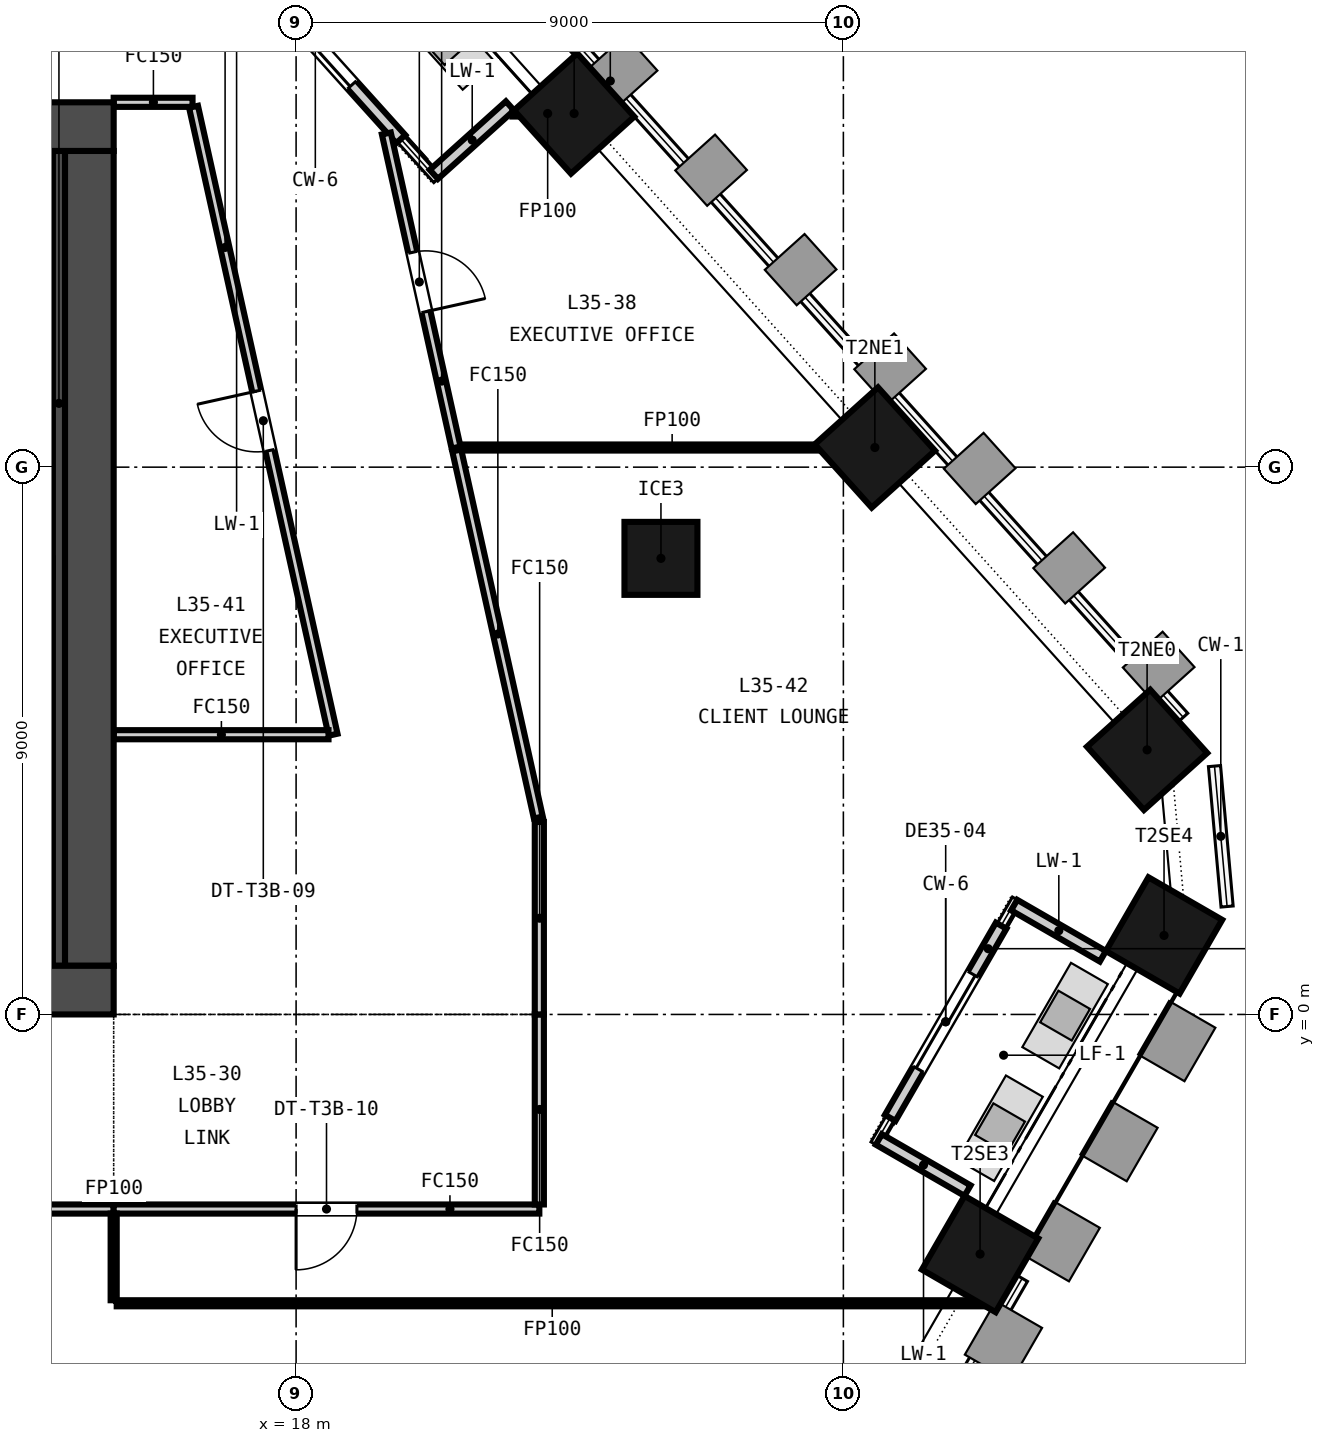
"""IFC4 building model, lengths in metres.
Left out: names, types, materials, properties, quantities, classifications, styles, units other than length and angle.
Written with IfcOpenShell. Run it as: python <this file> out.ifc"""

import sys

from ifc_helpers import new_model, si_unit, direction, frame, frame_2d, origin, origin_2d, place, context, subcontext, project, spatial, rectangle, extrude, element, fill, save


model = new_model("IFC4")
c1 = context("Model", 3, precision=1e-05, world=origin(), true_north=direction((0.0, 1.0)))
c2 = subcontext(c1, "Body", "Model", "MODEL_VIEW")
j1 = project(units=[si_unit("LENGTHUNIT", "METRE"), si_unit("PLANEANGLEUNIT", "RADIAN")], contexts=[c1])
p1 = place(None, origin())
s1 = spatial("IfcSite", under=j1, at=p1, CompositionType="ELEMENT")
p2 = place(p1, origin())
s2 = spatial("IfcBuilding", under=s1, at=p2, CompositionType="ELEMENT")
p3 = place(p2, frame((0.0, 0.0, 144.4)))
s3 = spatial("IfcBuildingStorey", under=s2, at=p3, CompositionType="ELEMENT", Elevation=144.4)
p4 = place(p3, frame((-15.0, 0.4, -0.15), z_axis=(0.0, 0.0, 1.0), x_axis=(1.0, 0.0, 0.0)))
e1 = element("IfcWall", 1, at=p4, inside=s3, PredefinedType="SOLIDWALL", context=c2, shape_type="SweptSolid", body=[
    extrude(rectangle(XDim=30.0, YDim=0.8, at=frame_2d((15.0, 0.0))), origin(), (0.0, 0.0, 1.0), 3.65),
])
p5 = place(p4, frame((5.8, 0.0, 0.15)))
e2 = element("IfcOpeningElement", 2, at=p5, cuts=e1, PredefinedType="OPENING", context=c2, shape_type="SweptSolid", body=[
    extrude(rectangle(XDim=2.4, YDim=2.4, at=frame_2d((1.2, 1.2))), frame((0.0, 0.41, 0.0), z_axis=(0.0, -1.0, 0.0), x_axis=(1.0, 0.0, 0.0)), (0.0, 0.0, 1.0), 0.82),
])
p6 = place(p4, frame((13.8, 0.0, 0.15)))
e3 = element("IfcOpeningElement", 3, at=p6, cuts=e1, PredefinedType="OPENING", context=c2, shape_type="SweptSolid", body=[
    extrude(rectangle(XDim=2.4, YDim=2.4, at=frame_2d((1.2, 1.2))), frame((0.0, 0.41, 0.0), z_axis=(0.0, -1.0, 0.0), x_axis=(1.0, 0.0, 0.0)), (0.0, 0.0, 1.0), 0.82),
])
p7 = place(p4, frame((21.8, 0.0, 0.15)))
e4 = element("IfcOpeningElement", 4, at=p7, cuts=e1, PredefinedType="OPENING", context=c2, shape_type="SweptSolid", body=[
    extrude(rectangle(XDim=2.4, YDim=2.4, at=frame_2d((1.2, 1.2))), frame((0.0, 0.41, 0.0), z_axis=(0.0, -1.0, 0.0), x_axis=(1.0, 0.0, 0.0)), (0.0, 0.0, 1.0), 0.82),
])
p8 = place(p4, frame((1.5, 0.0, 0.15)))
e5 = element("IfcOpeningElement", 5, at=p8, cuts=e1, PredefinedType="OPENING", context=c2, shape_type="SweptSolid", body=[
    extrude(rectangle(XDim=1.2, YDim=2.1, at=frame_2d((0.6, 1.05))), frame((0.0, 0.41, 0.0), z_axis=(0.0, -1.0, 0.0), x_axis=(1.0, 0.0, 0.0)), (0.0, 0.0, 1.0), 0.82),
])
p9 = place(p4, frame((27.3, 0.0, 0.15)))
e6 = element("IfcOpeningElement", 6, at=p9, cuts=e1, PredefinedType="OPENING", context=c2, shape_type="SweptSolid", body=[
    extrude(rectangle(XDim=1.2, YDim=2.1, at=frame_2d((0.6, 1.05))), frame((0.0, 0.41, 0.0), z_axis=(0.0, -1.0, 0.0), x_axis=(1.0, 0.0, 0.0)), (0.0, 0.0, 1.0), 0.82),
])
p10 = place(p3, frame((-15.0, 14.6, -0.15), z_axis=(0.0, 0.0, 1.0), x_axis=(1.0, 0.0, 0.0)))
e7 = element("IfcWall", 7, at=p10, inside=s3, PredefinedType="SOLIDWALL", context=c2, shape_type="SweptSolid", body=[
    extrude(rectangle(XDim=30.0, YDim=0.8, at=frame_2d((15.0, 0.0))), origin(), (0.0, 0.0, 1.0), 3.65),
])
p11 = place(p10, frame((9.25, 0.0, 0.15)))
e8 = element("IfcOpeningElement", 8, at=p11, cuts=e7, PredefinedType="OPENING", context=c2, shape_type="SweptSolid", body=[
    extrude(rectangle(XDim=1.5, YDim=2.1, at=frame_2d((0.75, 1.05))), frame((0.0, 0.41, 0.0), z_axis=(0.0, -1.0, 0.0), x_axis=(1.0, 0.0, 0.0)), (0.0, 0.0, 1.0), 0.82),
])
p12 = place(p10, frame((19.4, 0.0, 0.15)))
e9 = element("IfcOpeningElement", 9, at=p12, cuts=e7, PredefinedType="OPENING", context=c2, shape_type="SweptSolid", body=[
    extrude(rectangle(XDim=1.5, YDim=2.1, at=frame_2d((0.75, 1.05))), frame((0.0, 0.41, 0.0), z_axis=(0.0, -1.0, 0.0), x_axis=(1.0, 0.0, 0.0)), (0.0, 0.0, 1.0), 0.82),
])
p13 = place(p10, frame((1.5, 0.0, 0.15)))
e10 = element("IfcOpeningElement", 10, at=p13, cuts=e7, PredefinedType="OPENING", context=c2, shape_type="SweptSolid", body=[
    extrude(rectangle(XDim=1.2, YDim=2.1, at=frame_2d((0.6, 1.05))), frame((0.0, 0.41, 0.0), z_axis=(0.0, -1.0, 0.0), x_axis=(1.0, 0.0, 0.0)), (0.0, 0.0, 1.0), 0.82),
])
p14 = place(p10, frame((27.3, 0.0, 0.15)))
e11 = element("IfcOpeningElement", 11, at=p14, cuts=e7, PredefinedType="OPENING", context=c2, shape_type="SweptSolid", body=[
    extrude(rectangle(XDim=1.2, YDim=2.1, at=frame_2d((0.6, 1.05))), frame((0.0, 0.41, 0.0), z_axis=(0.0, -1.0, 0.0), x_axis=(1.0, 0.0, 0.0)), (0.0, 0.0, 1.0), 0.82),
])
p15 = place(p3, frame((14.6, 0.8, -0.15), z_axis=(0.0, 0.0, 1.0), x_axis=(0.0, 1.0, 0.0)))
e12 = element("IfcWall", 12, at=p15, inside=s3, PredefinedType="SOLIDWALL", context=c2, shape_type="SweptSolid", body=[
    extrude(rectangle(XDim=13.4, YDim=0.8, at=frame_2d((6.7, 0.0))), origin(), (0.0, 0.0, 1.0), 3.65),
])
for number, where, z_axis, x_axis in (
    (13, (29.248, -3.94, -0.15), (0.0, 0.0, 1.0), (0.5, 0.866, 0.0)),
    (14, (32.273, 1.299, -0.15), (0.0, 0.0, 1.0), (0.5, 0.866, 0.0)),
    (15, (31.995, 4.351, -0.15), (0.0, 0.0, 1.0), (-0.669, 0.743, 0.0)),
    (16, (27.518, 9.323, -0.15), (0.0, 0.0, 1.0), (-0.669, 0.743, 0.0)),
    (17, (22.573, 14.816, -0.15), (0.0, 0.0, 1.0), (-0.669, 0.743, 0.0)),
):
    element("IfcColumn", number, at=place(p3, frame(where, z_axis=z_axis, x_axis=x_axis)), inside=s3, PredefinedType="COLUMN", context=c2, shape_type="SweptSolid", body=[
        extrude(rectangle(XDim=1.4, YDim=1.4, at=origin_2d()), origin(), (0.0, 0.0, 1.0), 3.65),
    ])
p16 = place(p3, frame((24.0, 7.5, -0.15), z_axis=(0.0, 0.0, 1.0), x_axis=(1.0, 0.0, 0.0)))
e18 = element("IfcColumn", 18, at=p16, inside=s3, PredefinedType="COLUMN", context=c2, shape_type="SweptSolid", body=[
    extrude(rectangle(XDim=1.2, YDim=1.2, at=origin_2d()), origin(), (0.0, 0.0, 1.0), 3.65),
])
p17 = place(p3, frame((27.77, -1.701, 0.0), z_axis=(0.0, 0.0, 1.0), x_axis=(0.500002310952, 0.866024069551, 0.0)))
e19 = element("IfcWall", 19, at=p17, inside=s3, PredefinedType="SOLIDWALL", context=c2, shape_type="SweptSolid", body=[
    extrude(rectangle(XDim=3.65, YDim=0.2, at=frame_2d((1.825, 0.0))), origin(), (0.0, 0.0, 1.0), 2.9),
])
p18 = place(p17, frame((0.925, 0.0, 0.0)))
e20 = element("IfcOpeningElement", 20, at=p18, cuts=e19, PredefinedType="OPENING", context=c2, shape_type="SweptSolid", body=[
    extrude(rectangle(XDim=1.8, YDim=2.4, at=frame_2d((0.9, 1.2))), frame((0.0, 0.11, 0.0), z_axis=(0.0, -1.0, 0.0), x_axis=(1.0, 0.0, 0.0)), (0.0, 0.0, 1.0), 0.22),
])
for number, where, z_axis, x_axis in (
    (21, (29.042, -2.897, 0.0), (0.0, 0.0, 1.0), (-0.866, 0.5, 0.0)),
    (22, (31.267, 0.957, 0.0), (0.0, 0.0, 1.0), (-0.866, 0.5, 0.0)),
):
    element("IfcWall", number, at=place(p3, frame(where, z_axis=z_axis, x_axis=x_axis)), inside=s3, PredefinedType="SOLIDWALL", context=c2, shape_type="SweptSolid", body=[
        extrude(rectangle(XDim=1.684, YDim=0.2, at=frame_2d((0.842, 0.0))), origin(), (0.0, 0.0, 1.0), 3.05),
    ])
p19 = place(p3, frame((19.721, 14.395, 0.0), z_axis=(0.0, 0.0, 1.0), x_axis=(-0.669170241733, 0.743109135712, 0.0)))
e23 = element("IfcWall", 23, at=p19, inside=s3, PredefinedType="SOLIDWALL", context=c2, shape_type="SweptSolid", body=[
    extrude(rectangle(XDim=4.2, YDim=0.2, at=frame_2d((2.1, 0.0))), origin(), (0.0, 0.0, 1.0), 2.897),
])
p20 = place(p19, frame((1.2, 0.0, 0.0)))
e24 = element("IfcOpeningElement", 24, at=p20, cuts=e23, PredefinedType="OPENING", context=c2, shape_type="SweptSolid", body=[
    extrude(rectangle(XDim=1.8, YDim=2.4, at=frame_2d((0.9, 1.2))), frame((0.0, 0.11, 0.0), z_axis=(0.0, -1.0, 0.0), x_axis=(1.0, 0.0, 0.0)), (0.0, 0.0, 1.0), 0.22),
])
p21 = place(p3, frame((21.517, 14.942, 0.0), z_axis=(0.0, 0.0, 1.0), x_axis=(-0.743178790238, -0.669092882745, 0.0)))
e25 = element("IfcWall", 25, at=p21, inside=s3, PredefinedType="SOLIDWALL", context=c2, shape_type="SweptSolid", body=[
    extrude(rectangle(XDim=1.684, YDim=0.2, at=frame_2d((0.842, 0.0))), origin(), (0.0, 0.0, 1.0), 2.897),
])
p22 = place(p3, frame((11.05, 7.35, 0.0), z_axis=(0.0, 0.0, 1.0), x_axis=(1.0, 0.0, 0.0)))
e26 = element("IfcWall", 26, at=p22, inside=s3, PredefinedType="SOLIDWALL", context=c2, shape_type="SweptSolid", body=[
    extrude(rectangle(XDim=2.95, YDim=0.3, at=frame_2d((1.475, 0.0))), origin(), (0.0, 0.0, 1.0), 3.5),
])
p23 = place(p3, frame((14.1, 0.8, 0.0), z_axis=(0.0, 0.0, 1.0), x_axis=(0.0, 1.0, 0.0)))
e27 = element("IfcWall", 27, at=p23, inside=s3, PredefinedType="SOLIDWALL", context=c2, shape_type="SweptSolid", body=[
    extrude(rectangle(XDim=13.4, YDim=0.2, at=frame_2d((6.7, 0.0))), origin(), (0.0, 0.0, 1.0), 3.5),
])
p24 = place(p3, frame((15.0, -3.2, 0.0), z_axis=(0.0, 0.0, 1.0), x_axis=(-1.0, 0.0, 0.0)))
e28 = element("IfcWall", 28, at=p24, inside=s3, PredefinedType="PARTITIONING", context=c2, shape_type="SweptSolid", body=[
    extrude(rectangle(XDim=15.617, YDim=0.15, at=frame_2d((7.809, 0.0))), origin(), (0.0, 0.0, 1.0), 2.741),
])
p25 = place(p24, frame((6.908, 0.0, 0.0)))
e29 = element("IfcOpeningElement", 29, at=p25, cuts=e28, PredefinedType="OPENING", context=c2, shape_type="SweptSolid", body=[
    extrude(rectangle(XDim=1.8, YDim=2.1, at=frame_2d((0.9, 1.05))), frame((0.0, 0.085, 0.0), z_axis=(0.0, -1.0, 0.0), x_axis=(1.0, 0.0, 0.0)), (0.0, 0.0, 1.0), 0.17),
])
p26 = place(p3, frame((22.0, -3.2, 0.0), z_axis=(0.0, 0.0, 1.0), x_axis=(-1.0, 0.0, 0.0)))
e30 = element("IfcWall", 30, at=p26, inside=s3, PredefinedType="PARTITIONING", context=c2, shape_type="SweptSolid", body=[
    extrude(rectangle(XDim=7.0, YDim=0.15, at=frame_2d((3.5, 0.0))), origin(), (0.0, 0.0, 1.0), 2.741),
])
p27 = place(p26, frame((3.0, 0.0, 0.0)))
e31 = element("IfcOpeningElement", 31, at=p27, cuts=e30, PredefinedType="OPENING", context=c2, shape_type="SweptSolid", body=[
    extrude(rectangle(XDim=1.0, YDim=2.1, at=frame_2d((0.5, 1.05))), frame((0.0, 0.085, 0.0), z_axis=(0.0, -1.0, 0.0), x_axis=(1.0, 0.0, 0.0)), (0.0, 0.0, 1.0), 0.17),
])
p28 = place(p3, frame((22.0, 0.0, 0.0), z_axis=(0.0, 0.0, 1.0), x_axis=(0.0, -1.0, 0.0)))
e32 = element("IfcWall", 32, at=p28, inside=s3, PredefinedType="PARTITIONING", context=c2, shape_type="SweptSolid", body=[
    extrude(rectangle(XDim=3.125, YDim=0.15, at=frame_2d((1.562, 0.0))), origin(), (0.0, 0.0, 1.0), 2.741),
])
p29 = place(p3, frame((16.297, 15.0, 0.0), z_axis=(0.0, 0.0, 1.0), x_axis=(-1.0, 0.0, 0.0)))
e33 = element("IfcWall", 33, at=p29, inside=s3, PredefinedType="PARTITIONING", context=c2, shape_type="SweptSolid", body=[
    extrude(rectangle(XDim=1.297, YDim=0.15, at=frame_2d((0.648, 0.0))), origin(), (0.0, 0.0, 1.0), 2.741),
])
p30 = place(p3, frame((18.608, 4.6, 0.0), z_axis=(0.0, 0.0, 1.0), x_axis=(-0.21691823958, 0.976189775268, 0.0)))
e34 = element("IfcWall", 34, at=p30, inside=s3, PredefinedType="PARTITIONING", context=c2, shape_type="SweptSolid", body=[
    extrude(rectangle(XDim=10.579, YDim=0.15, at=frame_2d((5.289, 0.0))), origin(), (0.0, 0.0, 1.0), 2.741),
])
p31 = place(p30, frame((4.789, 0.0, 0.0)))
e35 = element("IfcOpeningElement", 35, at=p31, cuts=e34, PredefinedType="OPENING", context=c2, shape_type="SweptSolid", body=[
    extrude(rectangle(XDim=1.0, YDim=2.1, at=frame_2d((0.5, 1.05))), frame((0.0, 0.085, 0.0), z_axis=(0.0, -1.0, 0.0), x_axis=(1.0, 0.0, 0.0)), (0.0, 0.0, 1.0), 0.17),
])
p32 = place(p3, frame((22.0, 3.165, 0.0), z_axis=(0.0, 0.0, 1.0), x_axis=(0.0, -1.0, 0.0)))
e36 = element("IfcWall", 36, at=p32, inside=s3, PredefinedType="PARTITIONING", context=c2, shape_type="SweptSolid", body=[
    extrude(rectangle(XDim=3.165, YDim=0.15, at=frame_2d((1.583, 0.0))), origin(), (0.0, 0.0, 1.0), 2.741),
])
p33 = place(p3, frame((21.557, 14.816, 0.0), z_axis=(0.0, 0.0, 1.0), x_axis=(1.0, 0.0, 0.0)))
e37 = element("IfcWall", 37, at=p33, inside=s3, PredefinedType="PARTITIONING", context=c2, shape_type="SweptSolid", body=[
    extrude(rectangle(XDim=1.15, YDim=0.1, at=frame_2d((0.575, 0.0))), origin(), (0.0, 0.0, 1.0), 2.741),
])
p34 = place(p3, frame((19.484, 14.487, 0.0), z_axis=(0.0, 0.0, 1.0), x_axis=(0.216857160719, -0.976203345541, 0.0)))
e38 = element("IfcWall", 38, at=p34, inside=s3, PredefinedType="PARTITIONING", context=c2, shape_type="SweptSolid", body=[
    extrude(rectangle(XDim=5.29, YDim=0.15, at=frame_2d((2.645, 0.0))), origin(), (0.0, 0.0, 1.0), 2.741),
])
p35 = place(p34, frame((2.002, 0.0, 0.0)))
e39 = element("IfcOpeningElement", 39, at=p35, cuts=e38, PredefinedType="OPENING", context=c2, shape_type="SweptSolid", body=[
    extrude(rectangle(XDim=1.0, YDim=2.1, at=frame_2d((0.5, 1.05))), frame((0.0, 0.085, 0.0), z_axis=(0.0, -1.0, 0.0), x_axis=(1.0, 0.0, 0.0)), (0.0, 0.0, 1.0), 0.17),
])
p36 = place(p3, frame((20.706, 9.323, 0.0), z_axis=(0.0, 0.0, 1.0), x_axis=(1.0, 0.0, 0.0)))
e40 = element("IfcWall", 40, at=p36, inside=s3, PredefinedType="PARTITIONING", context=c2, shape_type="SweptSolid", body=[
    extrude(rectangle(XDim=6.946, YDim=0.1, at=frame_2d((3.473, 0.0))), origin(), (0.0, 0.0, 1.0), 2.741),
])
p37 = place(p3, frame((15.0, 4.6, 0.0), z_axis=(0.0, 0.0, 1.0), x_axis=(1.0, 0.0, 0.0)))
e41 = element("IfcWall", 41, at=p37, inside=s3, PredefinedType="PARTITIONING", context=c2, shape_type="SweptSolid", body=[
    extrude(rectangle(XDim=3.533, YDim=0.15, at=frame_2d((1.767, 0.0))), origin(), (0.0, 0.0, 1.0), 2.741),
])
p38 = place(p3, frame((20.642, 9.274, 0.0), z_axis=(0.0, 0.0, 1.0), x_axis=(0.217005709604, -0.976170334521, 0.0)))
e42 = element("IfcWall", 42, at=p38, inside=s3, PredefinedType="PARTITIONING", context=c2, shape_type="SweptSolid", body=[
    extrude(rectangle(XDim=6.183, YDim=0.15, at=frame_2d((3.092, 0.0))), origin(), (0.0, 0.0, 1.0), 2.741),
])
p39 = place(p3, frame((15.05, -4.75, 0.0), z_axis=(0.0, 0.0, 1.0), x_axis=(1.0, 0.0, 0.0)))
e43 = element("IfcWall", 43, at=p39, inside=s3, PredefinedType="PARTITIONING", context=c2, shape_type="SweptSolid", body=[
    extrude(rectangle(XDim=14.314, YDim=0.1, at=frame_2d((7.157, 0.0))), origin(), (0.0, 0.0, 1.0), 2.741),
])
p40 = place(p3, frame((15.0, -4.7, 0.0), z_axis=(0.0, 0.0, 1.0), x_axis=(0.0, 1.0, 0.0)))
e44 = element("IfcWall", 44, at=p40, inside=s3, PredefinedType="PARTITIONING", context=c2, shape_type="SweptSolid", body=[
    extrude(rectangle(XDim=1.425, YDim=0.1, at=frame_2d((0.712, 0.0))), origin(), (0.0, 0.0, 1.0), 2.741),
])
p41 = place(p18, origin())
e45 = element("IfcDoor", 45, at=p41, inside=s3, OperationType="SINGLE_SWING_LEFT", PredefinedType="DOOR", context=c2, shape_type="SweptSolid", body=[
    extrude(rectangle(XDim=1.8, YDim=2.4, at=frame_2d((0.9, 1.2))), frame((0.0, 0.025, 0.0), z_axis=(0.0, -1.0, 0.0), x_axis=(1.0, 0.0, 0.0)), (0.0, 0.0, 1.0), 0.05),
])
fill(e20, e45)
p42 = place(p20, origin())
e46 = element("IfcDoor", 46, at=p42, inside=s3, OperationType="SINGLE_SWING_LEFT", PredefinedType="DOOR", context=c2, shape_type="SweptSolid", body=[
    extrude(rectangle(XDim=1.8, YDim=2.4, at=frame_2d((0.9, 1.2))), frame((0.0, 0.025, 0.0), z_axis=(0.0, -1.0, 0.0), x_axis=(1.0, 0.0, 0.0)), (0.0, 0.0, 1.0), 0.05),
])
fill(e24, e46)
p43 = place(p35, origin())
e47 = element("IfcDoor", 47, at=p43, inside=s3, OperationType="SINGLE_SWING_RIGHT", PredefinedType="DOOR", context=c2, shape_type="SweptSolid", body=[
    extrude(rectangle(XDim=1.0, YDim=2.1, at=frame_2d((0.5, 1.05))), frame((0.0, 0.025, 0.0), z_axis=(0.0, -1.0, 0.0), x_axis=(1.0, 0.0, 0.0)), (0.0, 0.0, 1.0), 0.05),
])
fill(e39, e47)
p44 = place(p31, origin())
e48 = element("IfcDoor", 48, at=p44, inside=s3, OperationType="SINGLE_SWING_RIGHT", PredefinedType="DOOR", context=c2, shape_type="SweptSolid", body=[
    extrude(rectangle(XDim=1.0, YDim=2.1, at=frame_2d((0.5, 1.05))), frame((0.0, 0.025, 0.0), z_axis=(0.0, -1.0, 0.0), x_axis=(1.0, 0.0, 0.0)), (0.0, 0.0, 1.0), 0.05),
])
fill(e35, e48)
p45 = place(p27, origin())
e49 = element("IfcDoor", 49, at=p45, inside=s3, OperationType="SINGLE_SWING_RIGHT", PredefinedType="DOOR", context=c2, shape_type="SweptSolid", body=[
    extrude(rectangle(XDim=1.0, YDim=2.1, at=frame_2d((0.5, 1.05))), frame((0.0, 0.025, 0.0), z_axis=(0.0, -1.0, 0.0), x_axis=(1.0, 0.0, 0.0)), (0.0, 0.0, 1.0), 0.05),
])
fill(e31, e49)
save(model, sys.argv[1])
